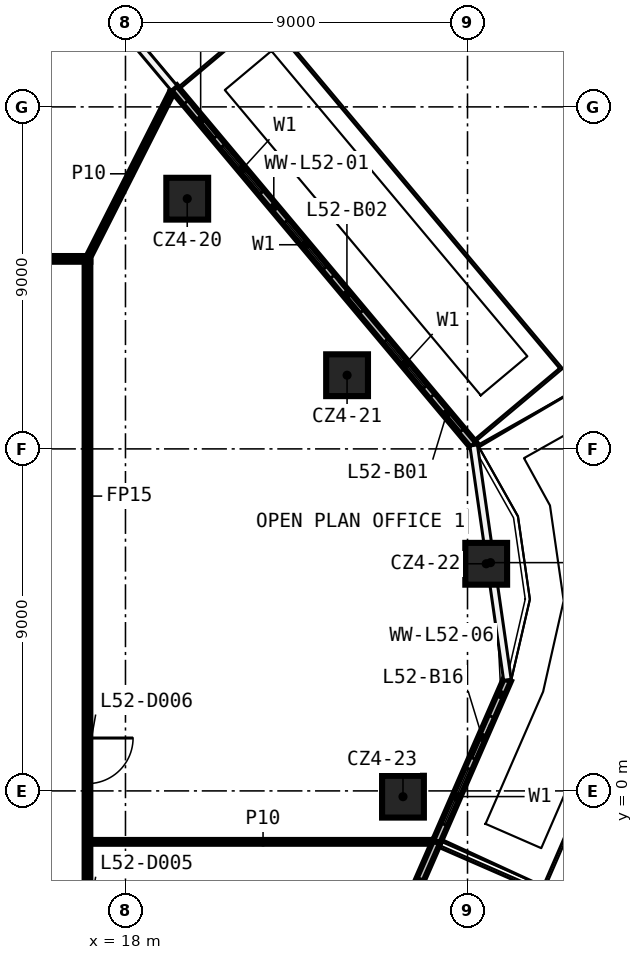
"""IFC4 building model, lengths in metres.
Left out: names, types, materials, properties, quantities, classifications, styles, units other than length and angle.
Written with IfcOpenShell. Run it as: python <this file> out.ifc"""

import sys

from ifc_helpers import new_model, si_unit, direction, frame, frame_2d, origin, origin_2d, place, context, subcontext, project, spatial, rectangle, extrude, element, fill, save


model = new_model("IFC4")
c1 = context("Model", 3, precision=1e-05, world=origin(), true_north=direction((0.0, 1.0)))
c2 = subcontext(c1, "Body", "Model", "MODEL_VIEW")
j1 = project(units=[si_unit("LENGTHUNIT", "METRE"), si_unit("PLANEANGLEUNIT", "RADIAN")], contexts=[c1])
p1 = place(None, origin())
s1 = spatial("IfcSite", under=j1, at=p1, CompositionType="ELEMENT")
p2 = place(p1, origin())
s2 = spatial("IfcBuilding", under=s1, at=p2, CompositionType="ELEMENT")
p3 = place(p2, frame((0.0, 0.0, 249.6)))
s3 = spatial("IfcBuildingStorey", under=s2, at=p3, CompositionType="ELEMENT", Elevation=249.6)
for number, where, z_axis, x_axis in (
    (1, (19.625, 15.584, 0.0), (0.0, 0.0, 1.0), (1.0, 0.0, 0.0)),
    (2, (23.831, 10.939, 0.0), (0.0, 0.0, 1.0), (1.0, 0.0, 0.0)),
    (3, (27.492, 5.977, 0.0), (0.0, 0.0, 1.0), (1.0, 0.0, 0.0)),
    (4, (25.302, -0.152, 0.0), (0.0, 0.0, 1.0), (1.0, 0.0, 0.0)),
):
    element("IfcColumn", number, at=place(p3, frame(where, z_axis=z_axis, x_axis=x_axis)), inside=s3, PredefinedType="COLUMN", context=c2, shape_type="SweptSolid", body=[
        extrude(rectangle(XDim=1.1, YDim=1.1, at=origin_2d()), origin(), (0.0, 0.0, 1.0), 3.82),
    ])
p4 = place(p3, frame((17.075, -1.341, 0.0), z_axis=(0.0, 0.0, 1.0), x_axis=(1.0, 0.0, 0.0)))
e5 = element("IfcWall", 5, at=p4, inside=s3, PredefinedType="PARTITIONING", context=c2, shape_type="SweptSolid", body=[
    extrude(rectangle(XDim=9.09, YDim=0.1, at=frame_2d((4.545, 0.0))), origin(), (0.0, 0.0, 1.0), 3.82),
])
p5 = place(p3, frame((-9.075, 14.0, 0.0), z_axis=(0.0, 0.0, 1.0), x_axis=(1.0, 0.0, 0.0)))
e6 = element("IfcWall", 6, at=p5, inside=s3, PredefinedType="PARTITIONING", context=c2, shape_type="SweptSolid", body=[
    extrude(rectangle(XDim=26.15, YDim=0.15, at=frame_2d((13.075, 0.0))), origin(), (0.0, 0.0, 1.0), 3.82),
])
p6 = place(p5, frame((20.934, 0.0, 0.0)))
e7 = element("IfcOpeningElement", 7, at=p6, cuts=e6, PredefinedType="OPENING", context=c2, shape_type="SweptSolid", body=[
    extrude(rectangle(XDim=1.2, YDim=2.1, at=frame_2d((0.6, 1.05))), frame((0.0, 0.085, 0.0), z_axis=(0.0, -1.0, 0.0), x_axis=(1.0, 0.0, 0.0)), (0.0, 0.0, 1.0), 0.17),
])
p7 = place(p5, frame((15.49, 0.0, 0.0)))
e8 = element("IfcOpeningElement", 8, at=p7, cuts=e6, PredefinedType="OPENING", context=c2, shape_type="SweptSolid", body=[
    extrude(rectangle(XDim=1.2, YDim=2.1, at=frame_2d((0.6, 1.05))), frame((0.0, 0.085, 0.0), z_axis=(0.0, -1.0, 0.0), x_axis=(1.0, 0.0, 0.0)), (0.0, 0.0, 1.0), 0.17),
])
p8 = place(p5, frame((7.396, 0.0, 0.0)))
e9 = element("IfcOpeningElement", 9, at=p8, cuts=e6, PredefinedType="OPENING", context=c2, shape_type="SweptSolid", body=[
    extrude(rectangle(XDim=1.2, YDim=2.1, at=frame_2d((0.6, 1.05))), frame((0.0, 0.085, 0.0), z_axis=(0.0, -1.0, 0.0), x_axis=(1.0, 0.0, 0.0)), (0.0, 0.0, 1.0), 0.17),
])
p9 = place(p5, frame((3.346, 0.0, 0.0)))
e10 = element("IfcOpeningElement", 10, at=p9, cuts=e6, PredefinedType="OPENING", context=c2, shape_type="SweptSolid", body=[
    extrude(rectangle(XDim=1.2, YDim=2.1, at=frame_2d((0.6, 1.05))), frame((0.0, 0.085, 0.0), z_axis=(0.0, -1.0, 0.0), x_axis=(1.0, 0.0, 0.0)), (0.0, 0.0, 1.0), 0.17),
])
p10 = place(p3, frame((17.0, 14.0, 0.0), z_axis=(0.0, 0.0, 1.0), x_axis=(0.451643796449, 0.892198341811, 0.0)))
e11 = element("IfcWall", 11, at=p10, inside=s3, PredefinedType="PARTITIONING", context=c2, shape_type="SweptSolid", body=[
    extrude(rectangle(XDim=5.02, YDim=0.1, at=frame_2d((2.51, 0.0))), origin(), (0.0, 0.0, 1.0), 3.82),
])
p11 = place(p3, frame((17.0, 13.925, 0.0), z_axis=(0.0, 0.0, 1.0), x_axis=(0.0, -1.0, 0.0)))
e12 = element("IfcWall", 12, at=p11, inside=s3, PredefinedType="PARTITIONING", context=c2, shape_type="SweptSolid", body=[
    extrude(rectangle(XDim=27.85, YDim=0.15, at=frame_2d((13.925, 0.0))), origin(), (0.0, 0.0, 1.0), 3.82),
])
p12 = place(p11, frame((16.802, 0.0, 0.0)))
e13 = element("IfcOpeningElement", 13, at=p12, cuts=e12, PredefinedType="OPENING", context=c2, shape_type="SweptSolid", body=[
    extrude(rectangle(XDim=1.2, YDim=2.1, at=frame_2d((0.6, 1.05))), frame((0.0, 0.085, 0.0), z_axis=(0.0, -1.0, 0.0), x_axis=(1.0, 0.0, 0.0)), (0.0, 0.0, 1.0), 0.17),
])
p13 = place(p11, frame((12.534, 0.0, 0.0)))
e14 = element("IfcOpeningElement", 14, at=p13, cuts=e12, PredefinedType="OPENING", context=c2, shape_type="SweptSolid", body=[
    extrude(rectangle(XDim=1.2, YDim=2.1, at=frame_2d((0.6, 1.05))), frame((0.0, 0.085, 0.0), z_axis=(0.0, -1.0, 0.0), x_axis=(1.0, 0.0, 0.0)), (0.0, 0.0, 1.0), 0.17),
])
p14 = place(p3, frame((27.162, 9.091, 0.0), z_axis=(0.0, 0.0, 1.0), x_axis=(-0.642398297857, 0.766370946025, 0.0)))
e15 = element("IfcWall", 15, at=p14, inside=s3, PredefinedType="SOLIDWALL", context=c2, shape_type="SweptSolid", body=[
    extrude(rectangle(XDim=12.275, YDim=0.2, at=frame_2d((6.137, 0.0))), origin(), (0.0, 0.0, 1.0), 3.82),
])
p15 = place(p14, frame((2.0, 0.0, 0.6)))
e16 = element("IfcOpeningElement", 16, at=p15, cuts=e15, PredefinedType="OPENING", context=c2, shape_type="SweptSolid", body=[
    extrude(rectangle(XDim=1.6, YDim=2.4, at=frame_2d((0.8, 1.2))), frame((0.0, 0.11, 0.0), z_axis=(0.0, -1.0, 0.0), x_axis=(1.0, 0.0, 0.0)), (0.0, 0.0, 1.0), 0.22),
])
p16 = place(p14, frame((0.5, 0.0, 0.0)))
e17 = element("IfcOpeningElement", 17, at=p16, cuts=e15, PredefinedType="OPENING", context=c2, shape_type="SweptSolid", body=[
    extrude(rectangle(XDim=1.2, YDim=2.4, at=frame_2d((0.6, 1.2))), frame((0.0, 0.11, 0.0), z_axis=(0.0, -1.0, 0.0), x_axis=(1.0, 0.0, 0.0)), (0.0, 0.0, 1.0), 0.22),
])
p17 = place(p14, frame((6.092, 0.0, 0.6)))
e18 = element("IfcOpeningElement", 18, at=p17, cuts=e15, PredefinedType="OPENING", context=c2, shape_type="SweptSolid", body=[
    extrude(rectangle(XDim=1.6, YDim=2.4, at=frame_2d((0.8, 1.2))), frame((0.0, 0.11, 0.0), z_axis=(0.0, -1.0, 0.0), x_axis=(1.0, 0.0, 0.0)), (0.0, 0.0, 1.0), 0.22),
])
p18 = place(p14, frame((4.592, 0.0, 0.0)))
e19 = element("IfcOpeningElement", 19, at=p18, cuts=e15, PredefinedType="OPENING", context=c2, shape_type="SweptSolid", body=[
    extrude(rectangle(XDim=1.2, YDim=2.4, at=frame_2d((0.6, 1.2))), frame((0.0, 0.11, 0.0), z_axis=(0.0, -1.0, 0.0), x_axis=(1.0, 0.0, 0.0)), (0.0, 0.0, 1.0), 0.22),
])
p19 = place(p14, frame((8.683, 0.0, 0.6)))
e20 = element("IfcOpeningElement", 20, at=p19, cuts=e15, PredefinedType="OPENING", context=c2, shape_type="SweptSolid", body=[
    extrude(rectangle(XDim=1.6, YDim=2.4, at=frame_2d((0.8, 1.2))), frame((0.0, 0.11, 0.0), z_axis=(0.0, -1.0, 0.0), x_axis=(1.0, 0.0, 0.0)), (0.0, 0.0, 1.0), 0.22),
])
p20 = place(p14, frame((10.583, 0.0, 0.0)))
e21 = element("IfcOpeningElement", 21, at=p20, cuts=e15, PredefinedType="OPENING", context=c2, shape_type="SweptSolid", body=[
    extrude(rectangle(XDim=1.2, YDim=2.4, at=frame_2d((0.6, 1.2))), frame((0.0, 0.11, 0.0), z_axis=(0.0, -1.0, 0.0), x_axis=(1.0, 0.0, 0.0)), (0.0, 0.0, 1.0), 0.22),
])
p21 = place(p3, frame((20.588, -14.158, 0.0), z_axis=(0.0, 0.0, 1.0), x_axis=(0.400286749381, 0.916389937892, 0.0)))
e22 = element("IfcWall", 22, at=p21, inside=s3, PredefinedType="SOLIDWALL", context=c2, shape_type="SweptSolid", body=[
    extrude(rectangle(XDim=13.987, YDim=0.2, at=frame_2d((6.993, 0.0))), origin(), (0.0, 0.0, 1.0), 3.82),
])
p22 = place(p21, frame((0.5, 0.0, 0.6)))
e23 = element("IfcOpeningElement", 23, at=p22, cuts=e22, PredefinedType="OPENING", context=c2, shape_type="SweptSolid", body=[
    extrude(rectangle(XDim=1.6, YDim=2.4, at=frame_2d((0.8, 1.2))), frame((0.0, 0.11, 0.0), z_axis=(0.0, -1.0, 0.0), x_axis=(1.0, 0.0, 0.0)), (0.0, 0.0, 1.0), 0.22),
])
p23 = place(p21, frame((2.4, 0.0, 0.0)))
e24 = element("IfcOpeningElement", 24, at=p23, cuts=e22, PredefinedType="OPENING", context=c2, shape_type="SweptSolid", body=[
    extrude(rectangle(XDim=1.2, YDim=2.4, at=frame_2d((0.6, 1.2))), frame((0.0, 0.11, 0.0), z_axis=(0.0, -1.0, 0.0), x_axis=(1.0, 0.0, 0.0)), (0.0, 0.0, 1.0), 0.22),
])
p24 = place(p21, frame((6.662, 0.0, 0.6)))
e25 = element("IfcOpeningElement", 25, at=p24, cuts=e22, PredefinedType="OPENING", context=c2, shape_type="SweptSolid", body=[
    extrude(rectangle(XDim=1.6, YDim=2.4, at=frame_2d((0.8, 1.2))), frame((0.0, 0.11, 0.0), z_axis=(0.0, -1.0, 0.0), x_axis=(1.0, 0.0, 0.0)), (0.0, 0.0, 1.0), 0.22),
])
p25 = place(p21, frame((5.162, 0.0, 0.0)))
e26 = element("IfcOpeningElement", 26, at=p25, cuts=e22, PredefinedType="OPENING", context=c2, shape_type="SweptSolid", body=[
    extrude(rectangle(XDim=1.2, YDim=2.4, at=frame_2d((0.6, 1.2))), frame((0.0, 0.11, 0.0), z_axis=(0.0, -1.0, 0.0), x_axis=(1.0, 0.0, 0.0)), (0.0, 0.0, 1.0), 0.22),
])
p26 = place(p21, frame((11.324, 0.0, 0.6)))
e27 = element("IfcOpeningElement", 27, at=p26, cuts=e22, PredefinedType="OPENING", context=c2, shape_type="SweptSolid", body=[
    extrude(rectangle(XDim=1.6, YDim=2.4, at=frame_2d((0.8, 1.2))), frame((0.0, 0.11, 0.0), z_axis=(0.0, -1.0, 0.0), x_axis=(1.0, 0.0, 0.0)), (0.0, 0.0, 1.0), 0.22),
])
p27 = place(p21, frame((9.824, 0.0, 0.0)))
e28 = element("IfcOpeningElement", 28, at=p27, cuts=e22, PredefinedType="OPENING", context=c2, shape_type="SweptSolid", body=[
    extrude(rectangle(XDim=1.2, YDim=2.4, at=frame_2d((0.6, 1.2))), frame((0.0, 0.11, 0.0), z_axis=(0.0, -1.0, 0.0), x_axis=(1.0, 0.0, 0.0)), (0.0, 0.0, 1.0), 0.22),
])
p28 = place(p3, frame((26.187, -1.341, 0.0), z_axis=(0.0, 0.0, 1.0), x_axis=(0.400293036608, 0.916387191553, 0.0)))
e29 = element("IfcWall", 29, at=p28, inside=s3, PredefinedType="SOLIDWALL", context=c2, shape_type="SweptSolid", body=[
    extrude(rectangle(XDim=4.653, YDim=0.2, at=frame_2d((2.327, 0.0))), origin(), (0.0, 0.0, 1.0), 3.82),
])
p29 = place(p28, frame((0.5, 0.0, 0.6)))
e30 = element("IfcOpeningElement", 30, at=p29, cuts=e29, PredefinedType="OPENING", context=c2, shape_type="SweptSolid", body=[
    extrude(rectangle(XDim=1.6, YDim=2.4, at=frame_2d((0.8, 1.2))), frame((0.0, 0.11, 0.0), z_axis=(0.0, -1.0, 0.0), x_axis=(1.0, 0.0, 0.0)), (0.0, 0.0, 1.0), 0.22),
])
p30 = place(p28, frame((2.4, 0.0, 0.0)))
e31 = element("IfcOpeningElement", 31, at=p30, cuts=e29, PredefinedType="OPENING", context=c2, shape_type="SweptSolid", body=[
    extrude(rectangle(XDim=1.2, YDim=2.4, at=frame_2d((0.6, 1.2))), frame((0.0, 0.11, 0.0), z_axis=(0.0, -1.0, 0.0), x_axis=(1.0, 0.0, 0.0)), (0.0, 0.0, 1.0), 0.22),
])
p31 = place(p13, origin())
e32 = element("IfcDoor", 32, at=p31, inside=s3, OperationType="SINGLE_SWING_LEFT", PredefinedType="DOOR", context=c2, shape_type="SweptSolid", body=[
    extrude(rectangle(XDim=1.2, YDim=2.1, at=frame_2d((0.6, 1.05))), frame((0.0, 0.025, 0.0), z_axis=(0.0, -1.0, 0.0), x_axis=(1.0, 0.0, 0.0)), (0.0, 0.0, 1.0), 0.05),
])
fill(e14, e32)
p32 = place(p15, origin())
e33 = element("IfcWindow", 33, at=p32, inside=s3, PartitioningType="SINGLE_PANEL", PredefinedType="WINDOW", context=c2, shape_type="SweptSolid", body=[
    extrude(rectangle(XDim=1.6, YDim=2.4, at=frame_2d((0.8, 1.2))), frame((0.0, 0.03, 0.0), z_axis=(0.0, -1.0, 0.0), x_axis=(1.0, 0.0, 0.0)), (0.0, 0.0, 1.0), 0.06),
])
fill(e16, e33)
p33 = place(p16, origin())
e34 = element("IfcDoor", 34, at=p33, inside=s3, OperationType="SLIDING_TO_LEFT", PredefinedType="DOOR", context=c2, shape_type="SweptSolid", body=[
    extrude(rectangle(XDim=1.2, YDim=2.4, at=frame_2d((0.6, 1.2))), frame((0.0, 0.025, 0.0), z_axis=(0.0, -1.0, 0.0), x_axis=(1.0, 0.0, 0.0)), (0.0, 0.0, 1.0), 0.05),
])
fill(e17, e34)
p34 = place(p17, origin())
e35 = element("IfcWindow", 35, at=p34, inside=s3, PartitioningType="SINGLE_PANEL", PredefinedType="WINDOW", context=c2, shape_type="SweptSolid", body=[
    extrude(rectangle(XDim=1.6, YDim=2.4, at=frame_2d((0.8, 1.2))), frame((0.0, 0.03, 0.0), z_axis=(0.0, -1.0, 0.0), x_axis=(1.0, 0.0, 0.0)), (0.0, 0.0, 1.0), 0.06),
])
fill(e18, e35)
p35 = place(p18, origin())
e36 = element("IfcDoor", 36, at=p35, inside=s3, OperationType="SLIDING_TO_LEFT", PredefinedType="DOOR", context=c2, shape_type="SweptSolid", body=[
    extrude(rectangle(XDim=1.2, YDim=2.4, at=frame_2d((0.6, 1.2))), frame((0.0, 0.025, 0.0), z_axis=(0.0, -1.0, 0.0), x_axis=(1.0, 0.0, 0.0)), (0.0, 0.0, 1.0), 0.05),
])
fill(e19, e36)
p36 = place(p19, origin())
e37 = element("IfcWindow", 37, at=p36, inside=s3, PartitioningType="SINGLE_PANEL", PredefinedType="WINDOW", context=c2, shape_type="SweptSolid", body=[
    extrude(rectangle(XDim=1.6, YDim=2.4, at=frame_2d((0.8, 1.2))), frame((0.0, 0.03, 0.0), z_axis=(0.0, -1.0, 0.0), x_axis=(1.0, 0.0, 0.0)), (0.0, 0.0, 1.0), 0.06),
])
fill(e20, e37)
p37 = place(p20, origin())
e38 = element("IfcDoor", 38, at=p37, inside=s3, OperationType="SLIDING_TO_LEFT", PredefinedType="DOOR", context=c2, shape_type="SweptSolid", body=[
    extrude(rectangle(XDim=1.2, YDim=2.4, at=frame_2d((0.6, 1.2))), frame((0.0, 0.025, 0.0), z_axis=(0.0, -1.0, 0.0), x_axis=(1.0, 0.0, 0.0)), (0.0, 0.0, 1.0), 0.05),
])
fill(e21, e38)
p38 = place(p26, origin())
e39 = element("IfcWindow", 39, at=p38, inside=s3, PartitioningType="SINGLE_PANEL", PredefinedType="WINDOW", context=c2, shape_type="SweptSolid", body=[
    extrude(rectangle(XDim=1.6, YDim=2.4, at=frame_2d((0.8, 1.2))), frame((0.0, 0.03, 0.0), z_axis=(0.0, -1.0, 0.0), x_axis=(1.0, 0.0, 0.0)), (0.0, 0.0, 1.0), 0.06),
])
fill(e27, e39)
p39 = place(p29, origin())
e40 = element("IfcWindow", 40, at=p39, inside=s3, PartitioningType="SINGLE_PANEL", PredefinedType="WINDOW", context=c2, shape_type="SweptSolid", body=[
    extrude(rectangle(XDim=1.6, YDim=2.4, at=frame_2d((0.8, 1.2))), frame((0.0, 0.03, 0.0), z_axis=(0.0, -1.0, 0.0), x_axis=(1.0, 0.0, 0.0)), (0.0, 0.0, 1.0), 0.06),
])
fill(e30, e40)
p40 = place(p30, origin())
e41 = element("IfcDoor", 41, at=p40, inside=s3, OperationType="SLIDING_TO_LEFT", PredefinedType="DOOR", context=c2, shape_type="SweptSolid", body=[
    extrude(rectangle(XDim=1.2, YDim=2.4, at=frame_2d((0.6, 1.2))), frame((0.0, 0.025, 0.0), z_axis=(0.0, -1.0, 0.0), x_axis=(1.0, 0.0, 0.0)), (0.0, 0.0, 1.0), 0.05),
])
fill(e31, e41)
save(model, sys.argv[1])
